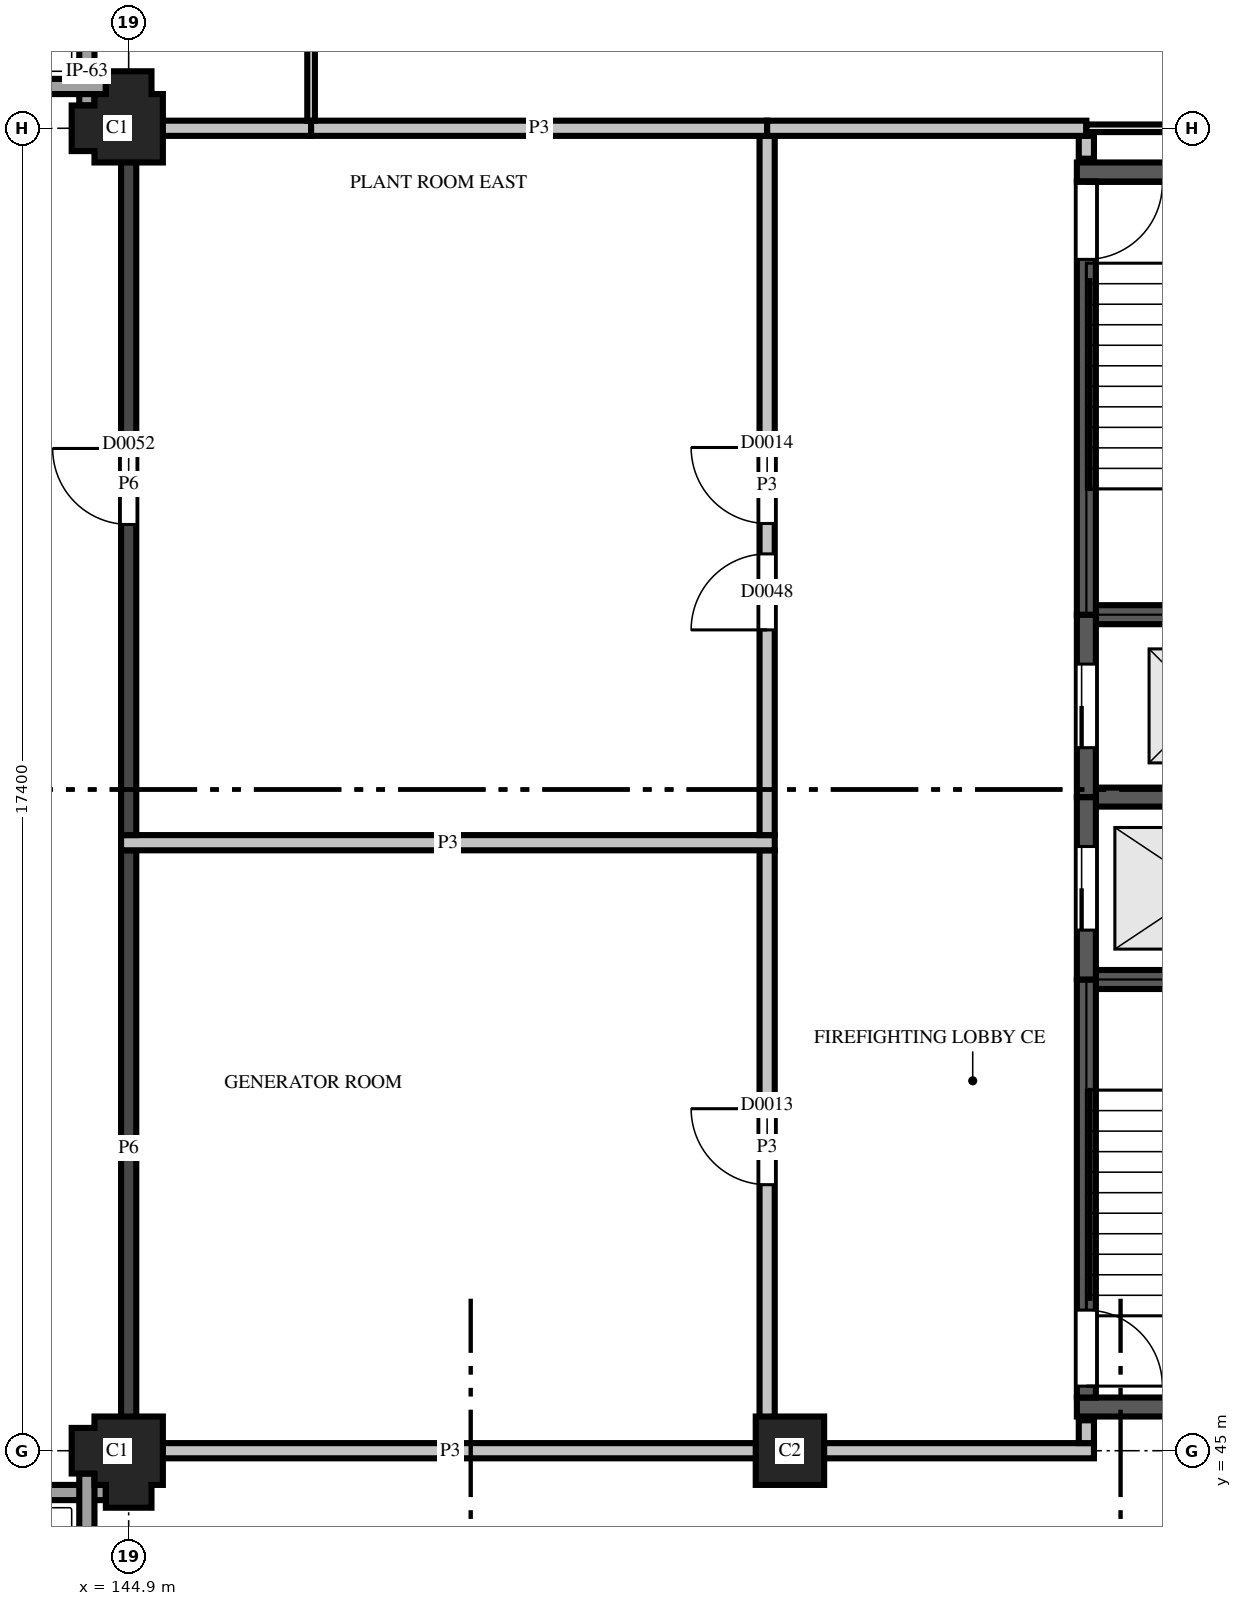
"""IFC4 building model, lengths in metres.
Left out: names, types, materials, properties, quantities, classifications, styles, units other than length and angle.
Written with IfcOpenShell. Run it as: python <this file> out.ifc"""

import sys

from ifc_helpers import new_model, si_unit, direction, frame, frame_2d, origin, place, context, subcontext, project, spatial, polyline, rectangle, outline, extrude, element, fill, save


model = new_model("IFC4")
c1 = context("Model", 3, precision=1e-05, world=origin(), true_north=direction((0.0, 1.0)))
c2 = subcontext(c1, "Body", "Model", "MODEL_VIEW")
j1 = project(units=[si_unit("LENGTHUNIT", "METRE"), si_unit("PLANEANGLEUNIT", "RADIAN")], contexts=[c1])
p1 = place(None, origin())
s1 = spatial("IfcSite", under=j1, at=p1, CompositionType="ELEMENT")
p2 = place(p1, origin())
s2 = spatial("IfcBuilding", under=s1, at=p2, CompositionType="ELEMENT")
p3 = place(p2, origin())
s3 = spatial("IfcBuildingStorey", under=s2, at=p3, CompositionType="ELEMENT", Elevation=0.0)
p4 = place(p3, frame((144.9, 45.0, 0.0), z_axis=(0.0, 0.0, 1.0), x_axis=(-1.0, 0.0, 0.0)))
e1 = element("IfcColumn", 1, at=p4, inside=s3, PredefinedType="COLUMN", context=c2, shape_type="SweptSolid", body=[
    extrude(outline(polyline([(-0.45, -0.45), (0.45, -0.45), (0.45, -0.3), (0.75, -0.3), (0.75, 0.3), (0.45, 0.3), (0.45, 0.45), (0.3, 0.45), (0.3, 0.75), (-0.3, 0.75), (-0.3, 0.45), (-0.45, 0.45), (-0.45, -0.45)])), origin(), (0.0, 0.0, 1.0), 4.5),
])
p5 = place(p3, frame((153.6, 45.0, 0.0), z_axis=(0.0, 0.0, 1.0), x_axis=(1.0, 0.0, 0.0)))
e2 = element("IfcColumn", 2, at=p5, inside=s3, PredefinedType="COLUMN", context=c2, shape_type="SweptSolid", body=[
    extrude(outline(polyline([(-0.45, -0.45), (0.45, -0.45), (0.45, 0.45), (-0.45, 0.45), (-0.45, -0.45)])), origin(), (0.0, 0.0, 1.0), 4.5),
])
p6 = place(p3, frame((144.9, 62.4, 0.0), z_axis=(0.0, 0.0, 1.0), x_axis=(0.0, 1.0, 0.0)))
e3 = element("IfcColumn", 3, at=p6, inside=s3, PredefinedType="COLUMN", context=c2, shape_type="SweptSolid", body=[
    extrude(outline(polyline([(-0.45, -0.45), (0.45, -0.45), (0.45, -0.3), (0.75, -0.3), (0.75, 0.3), (0.45, 0.3), (0.45, 0.45), (0.3, 0.45), (0.3, 0.75), (-0.3, 0.75), (-0.3, 0.45), (-0.45, 0.45), (-0.45, -0.45)])), origin(), (0.0, 0.0, 1.0), 4.5),
])
p7 = place(p3, frame((157.375, 45.575, 0.0), z_axis=(0.0, 0.0, 1.0), x_axis=(1.0, 0.0, 0.0)))
e4 = element("IfcWall", 4, at=p7, inside=s3, PredefinedType="SHEAR", context=c2, shape_type="SweptSolid", body=[
    extrude(rectangle(XDim=4.475, YDim=0.25, at=frame_2d((2.238, 0.0))), origin(), (0.0, 0.0, 1.0), 4.5),
])
p8 = place(p3, frame((157.625, 51.2, 0.0), z_axis=(0.0, 0.0, 1.0), x_axis=(1.0, 0.0, 0.0)))
e5 = element("IfcWall", 5, at=p8, inside=s3, PredefinedType="SHEAR", context=c2, shape_type="SweptSolid", body=[
    extrude(rectangle(XDim=3.025, YDim=0.25, at=frame_2d((1.512, 0.0))), origin(), (0.0, 0.0, 1.0), 4.5),
])
p9 = place(p3, frame((157.625, 53.6, -1.4), z_axis=(0.0, 0.0, 1.0), x_axis=(1.0, 0.0, 0.0)))
e6 = element("IfcWall", 6, at=p9, inside=s3, PredefinedType="SHEAR", context=c2, shape_type="SweptSolid", body=[
    extrude(rectangle(XDim=2.9, YDim=0.25, at=frame_2d((1.45, 0.0))), origin(), (0.0, 0.0, 1.0), 5.9),
])
p10 = place(p3, frame((157.625, 56.0, 0.0), z_axis=(0.0, 0.0, 1.0), x_axis=(1.0, 0.0, 0.0)))
e7 = element("IfcWall", 7, at=p10, inside=s3, PredefinedType="SHEAR", context=c2, shape_type="SweptSolid", body=[
    extrude(rectangle(XDim=3.025, YDim=0.25, at=frame_2d((1.512, 0.0))), origin(), (0.0, 0.0, 1.0), 4.5),
])
p11 = place(p3, frame((157.375, 61.825, 0.0), z_axis=(0.0, 0.0, 1.0), x_axis=(1.0, 0.0, 0.0)))
e8 = element("IfcWall", 8, at=p11, inside=s3, PredefinedType="SHEAR", context=c2, shape_type="SweptSolid", body=[
    extrude(rectangle(XDim=4.475, YDim=0.25, at=frame_2d((2.238, 0.0))), origin(), (0.0, 0.0, 1.0), 4.5),
])
p12 = place(p3, frame((157.5, 45.7, 0.0), z_axis=(0.0, 0.0, 1.0), x_axis=(0.0, 1.0, 0.0)))
e9 = element("IfcWall", 9, at=p12, inside=s3, PredefinedType="SHEAR", context=c2, shape_type="SweptSolid", body=[
    extrude(rectangle(XDim=5.5, YDim=0.25, at=frame_2d((2.75, 0.0))), origin(), (0.0, 0.0, 1.0), 4.5),
])
p13 = place(p12, frame((0.15, 0.0, 0.0)))
e10 = element("IfcOpeningElement", 10, at=p13, cuts=e9, PredefinedType="OPENING", context=c2, shape_type="SweptSolid", body=[
    extrude(rectangle(XDim=1.0, YDim=2.1, at=frame_2d((0.5, 1.05))), frame((0.0, 0.135, 0.0), z_axis=(0.0, -1.0, 0.0), x_axis=(1.0, 0.0, 0.0)), (0.0, 0.0, 1.0), 0.27),
])
p14 = place(p3, frame((157.5, 51.2, -1.4), z_axis=(0.0, 0.0, 1.0), x_axis=(0.0, 1.0, 0.0)))
e11 = element("IfcWall", 11, at=p14, inside=s3, PredefinedType="SHEAR", context=c2, shape_type="SweptSolid", body=[
    extrude(rectangle(XDim=2.4, YDim=0.25, at=frame_2d((1.2, 0.0))), origin(), (0.0, 0.0, 1.0), 5.9),
])
p15 = place(p14, frame((0.65, 0.0, 1.4)))
e12 = element("IfcOpeningElement", 12, at=p15, cuts=e11, PredefinedType="OPENING", context=c2, shape_type="SweptSolid", body=[
    extrude(rectangle(XDim=1.1, YDim=2.1, at=frame_2d((0.55, 1.05))), frame((0.0, 0.135, 0.0), z_axis=(0.0, -1.0, 0.0), x_axis=(1.0, 0.0, 0.0)), (0.0, 0.0, 1.0), 0.27),
])
p16 = place(p3, frame((157.5, 53.6, -1.4), z_axis=(0.0, 0.0, 1.0), x_axis=(0.0, 1.0, 0.0)))
e13 = element("IfcWall", 13, at=p16, inside=s3, PredefinedType="SHEAR", context=c2, shape_type="SweptSolid", body=[
    extrude(rectangle(XDim=2.4, YDim=0.25, at=frame_2d((1.2, 0.0))), origin(), (0.0, 0.0, 1.0), 5.9),
])
p17 = place(p16, frame((0.65, 0.0, 1.4)))
e14 = element("IfcOpeningElement", 14, at=p17, cuts=e13, PredefinedType="OPENING", context=c2, shape_type="SweptSolid", body=[
    extrude(rectangle(XDim=1.1, YDim=2.1, at=frame_2d((0.55, 1.05))), frame((0.0, 0.135, 0.0), z_axis=(0.0, -1.0, 0.0), x_axis=(1.0, 0.0, 0.0)), (0.0, 0.0, 1.0), 0.27),
])
p18 = place(p3, frame((157.5, 56.0, 0.0), z_axis=(0.0, 0.0, 1.0), x_axis=(0.0, 1.0, 0.0)))
e15 = element("IfcWall", 15, at=p18, inside=s3, PredefinedType="SHEAR", context=c2, shape_type="SweptSolid", body=[
    extrude(rectangle(XDim=5.7, YDim=0.25, at=frame_2d((2.85, 0.0))), origin(), (0.0, 0.0, 1.0), 4.5),
])
p19 = place(p18, frame((4.675, 0.0, 0.0)))
e16 = element("IfcOpeningElement", 16, at=p19, cuts=e15, PredefinedType="OPENING", context=c2, shape_type="SweptSolid", body=[
    extrude(rectangle(XDim=1.0, YDim=2.1, at=frame_2d((0.5, 1.05))), frame((0.0, 0.135, 0.0), z_axis=(0.0, -1.0, 0.0), x_axis=(1.0, 0.0, 0.0)), (0.0, 0.0, 1.0), 0.27),
])
p20 = place(p3, frame((137.7, 44.45, 0.0), z_axis=(0.0, 0.0, 1.0), x_axis=(1.0, 0.0, 0.0)))
e17 = element("IfcWall", 17, at=p20, inside=s3, PredefinedType="SOLIDWALL", context=c2, shape_type="SweptSolid", body=[
    extrude(outline(polyline([(0.0, 0.0), (6.9, 0.0), (6.9, 3.1), (6.002, 3.1), (6.0, 2.4), (5.681, 2.56), (5.363, 2.695), (5.044, 2.806), (4.725, 2.895), (4.406, 2.963), (4.087, 3.012), (3.769, 3.041), (3.45, 3.05), (3.131, 3.041), (2.812, 3.012), (2.494, 2.963), (2.175, 2.895), (1.856, 2.806), (1.538, 2.695), (1.219, 2.56), (0.9, 2.4), (0.898, 3.1), (0.0, 3.1), (0.0, 0.0)])), frame((0.0, 0.1, 0.0), z_axis=(0.0, -1.0, 0.0), x_axis=(1.0, 0.0, 0.0)), (0.0, 0.0, 1.0), 0.2),
])
p21 = place(p20, frame((3.0, 0.0, 2.4)))
e18 = element("IfcOpeningElement", 18, at=p21, cuts=e17, PredefinedType="OPENING", context=c2, shape_type="SweptSolid", body=[
    extrude(rectangle(XDim=0.9, YDim=0.531, at=frame_2d((0.45, 0.266))), frame((0.0, 0.11, 0.0), z_axis=(0.0, -1.0, 0.0), x_axis=(1.0, 0.0, 0.0)), (0.0, 0.0, 1.0), 0.22),
])
p22 = place(p3, frame((144.35, 44.7, 0.0), z_axis=(0.0, 0.0, 1.0), x_axis=(0.0, -1.0, 0.0)))
e19 = element("IfcWall", 19, at=p22, inside=s3, PredefinedType="SOLIDWALL", context=c2, shape_type="SweptSolid", body=[
    extrude(outline(polyline([(0.0, 0.0), (6.9, 0.0), (6.9, 3.1), (6.002, 3.1), (6.0, 2.4), (5.681, 2.56), (5.363, 2.695), (5.044, 2.806), (4.725, 2.895), (4.406, 2.963), (4.087, 3.012), (3.769, 3.041), (3.45, 3.05), (3.131, 3.041), (2.812, 3.012), (2.494, 2.963), (2.175, 2.895), (1.856, 2.806), (1.538, 2.695), (1.219, 2.56), (0.9, 2.4), (0.898, 3.1), (0.0, 3.1), (0.0, 0.0)])), frame((0.0, 0.1, 0.0), z_axis=(0.0, -1.0, 0.0), x_axis=(1.0, 0.0, 0.0)), (0.0, 0.0, 1.0), 0.2),
])
p23 = place(p22, frame((3.0, 0.0, 2.4)))
e20 = element("IfcOpeningElement", 20, at=p23, cuts=e19, PredefinedType="OPENING", context=c2, shape_type="SweptSolid", body=[
    extrude(rectangle(XDim=0.9, YDim=0.531, at=frame_2d((0.45, 0.266))), frame((0.0, 0.11, 0.0), z_axis=(0.0, -1.0, 0.0), x_axis=(1.0, 0.0, 0.0)), (0.0, 0.0, 1.0), 0.22),
])
p24 = place(p3, frame((144.35, 63.6, 0.0), z_axis=(0.0, 0.0, 1.0), x_axis=(0.0, -1.0, 0.0)))
e21 = element("IfcWall", 21, at=p24, inside=s3, PredefinedType="SOLIDWALL", context=c2, shape_type="SweptSolid", body=[
    extrude(rectangle(XDim=0.9, YDim=0.2, at=frame_2d((0.45, 0.0))), origin(), (0.0, 0.0, 1.0), 3.1),
])
p25 = place(p3, frame((144.6, 62.95, 0.0), z_axis=(0.0, 0.0, 1.0), x_axis=(-1.0, 0.0, 0.0)))
e22 = element("IfcWall", 22, at=p25, inside=s3, PredefinedType="SOLIDWALL", context=c2, shape_type="SweptSolid", body=[
    extrude(outline(polyline([(0.0, 0.0), (6.9, 0.0), (6.9, 2.4), (6.581, 2.56), (6.262, 2.695), (5.944, 2.806), (5.625, 2.895), (5.306, 2.963), (4.988, 3.012), (4.669, 3.041), (4.35, 3.05), (4.031, 3.041), (3.712, 3.012), (3.394, 2.963), (3.075, 2.895), (2.756, 2.806), (2.438, 2.695), (2.119, 2.56), (1.8, 2.4), (1.798, 3.1), (0.0, 3.1), (0.0, 0.0)])), frame((0.0, 0.1, 0.0), z_axis=(0.0, -1.0, 0.0), x_axis=(1.0, 0.0, 0.0)), (0.0, 0.0, 1.0), 0.2),
])
p26 = place(p25, frame((5.5, 0.0, 0.0)))
e23 = element("IfcOpeningElement", 23, at=p26, cuts=e22, PredefinedType="OPENING", context=c2, shape_type="SweptSolid", body=[
    extrude(rectangle(XDim=1.1, YDim=2.1, at=frame_2d((0.55, 1.05))), frame((0.0, 0.11, 0.0), z_axis=(0.0, -1.0, 0.0), x_axis=(1.0, 0.0, 0.0)), (0.0, 0.0, 1.0), 0.22),
])
p27 = place(p3, frame((144.96, 45.0, 0.0), z_axis=(0.0, 0.0, 1.0), x_axis=(1.0, 0.0, 0.0)))
e24 = element("IfcWall", 24, at=p27, inside=s3, PredefinedType="PARTITIONING", context=c2, shape_type="SweptSolid", body=[
    extrude(rectangle(XDim=8.34, YDim=0.2, at=frame_2d((4.17, 0.0))), origin(), (0.0, 0.0, 1.0), 3.68),
])
p28 = place(p3, frame((153.3, 45.0, 0.0), z_axis=(0.0, 0.0, 1.0), x_axis=(1.0, 0.0, 0.0)))
e25 = element("IfcWall", 25, at=p28, inside=s3, PredefinedType="PARTITIONING", context=c2, shape_type="SweptSolid", body=[
    extrude(rectangle(XDim=4.3, YDim=0.2, at=frame_2d((2.15, 0.0))), origin(), (0.0, 0.0, 1.0), 3.68),
])
p29 = place(p3, frame((157.5, 45.1, 0.0), z_axis=(0.0, 0.0, 1.0), x_axis=(0.0, 1.0, 0.0)))
e26 = element("IfcWall", 26, at=p29, inside=s3, PredefinedType="PARTITIONING", context=c2, shape_type="SweptSolid", body=[
    extrude(rectangle(XDim=0.3, YDim=0.2, at=frame_2d((0.15, 0.0))), origin(), (0.0, 0.0, 1.0), 3.68),
])
p30 = place(p3, frame((144.9, 52.9, 0.0), z_axis=(0.0, 0.0, 1.0), x_axis=(0.0, -1.0, 0.0)))
e27 = element("IfcWall", 27, at=p30, inside=s3, PredefinedType="PARTITIONING", context=c2, shape_type="SweptSolid", body=[
    extrude(rectangle(XDim=7.84, YDim=0.2, at=frame_2d((3.92, 0.0))), origin(), (0.0, 0.0, 1.0), 3.0),
])
p31 = place(p3, frame((153.3, 52.9, 0.0), z_axis=(0.0, 0.0, 1.0), x_axis=(0.0, -1.0, 0.0)))
e28 = element("IfcWall", 28, at=p31, inside=s3, PredefinedType="PARTITIONING", context=c2, shape_type="SweptSolid", body=[
    extrude(rectangle(XDim=7.8, YDim=0.2, at=frame_2d((3.9, 0.0))), origin(), (0.0, 0.0, 1.0), 3.68),
])
p32 = place(p31, frame((3.4, 0.0, 0.0)))
e29 = element("IfcOpeningElement", 29, at=p32, cuts=e28, PredefinedType="OPENING", context=c2, shape_type="SweptSolid", body=[
    extrude(rectangle(XDim=1.0, YDim=2.1, at=frame_2d((0.5, 1.05))), frame((0.0, 0.11, 0.0), z_axis=(0.0, -1.0, 0.0), x_axis=(1.0, 0.0, 0.0)), (0.0, 0.0, 1.0), 0.22),
])
p33 = place(p3, frame((153.4, 53.0, 0.0), z_axis=(0.0, 0.0, 1.0), x_axis=(-1.0, 0.0, 0.0)))
e30 = element("IfcWall", 30, at=p33, inside=s3, PredefinedType="PARTITIONING", context=c2, shape_type="SweptSolid", body=[
    extrude(rectangle(XDim=8.6, YDim=0.2, at=frame_2d((4.3, 0.0))), origin(), (0.0, 0.0, 1.0), 3.68),
])
p34 = place(p3, frame((157.5, 62.0, 0.0), z_axis=(0.0, 0.0, 1.0), x_axis=(0.0, 1.0, 0.0)))
e31 = element("IfcWall", 31, at=p34, inside=s3, PredefinedType="PARTITIONING", context=c2, shape_type="SweptSolid", body=[
    extrude(rectangle(XDim=0.3, YDim=0.2, at=frame_2d((0.15, 0.0))), origin(), (0.0, 0.0, 1.0), 3.68),
])
p35 = place(p3, frame((144.9, 62.34, 0.0), z_axis=(0.0, 0.0, 1.0), x_axis=(0.0, -1.0, 0.0)))
e32 = element("IfcWall", 32, at=p35, inside=s3, PredefinedType="PARTITIONING", context=c2, shape_type="SweptSolid", body=[
    extrude(rectangle(XDim=9.24, YDim=0.2, at=frame_2d((4.62, 0.0))), origin(), (0.0, 0.0, 1.0), 3.0),
])
p36 = place(p35, frame((4.153, 0.0, 0.0)))
e33 = element("IfcOpeningElement", 33, at=p36, cuts=e32, PredefinedType="OPENING", context=c2, shape_type="SweptSolid", body=[
    extrude(rectangle(XDim=1.0, YDim=2.1, at=frame_2d((0.5, 1.05))), frame((0.0, 0.11, 0.0), z_axis=(0.0, -1.0, 0.0), x_axis=(1.0, 0.0, 0.0)), (0.0, 0.0, 1.0), 0.22),
])
p37 = place(p3, frame((147.3, 62.4, 0.0), z_axis=(0.0, 0.0, 1.0), x_axis=(-1.0, 0.0, 0.0)))
e34 = element("IfcWall", 34, at=p37, inside=s3, PredefinedType="PARTITIONING", context=c2, shape_type="SweptSolid", body=[
    extrude(rectangle(XDim=2.34, YDim=0.2, at=frame_2d((1.17, 0.0))), origin(), (0.0, 0.0, 1.0), 3.68),
])
p38 = place(p3, frame((153.3, 62.3, 0.0), z_axis=(0.0, 0.0, 1.0), x_axis=(0.0, -1.0, 0.0)))
e35 = element("IfcWall", 35, at=p38, inside=s3, PredefinedType="PARTITIONING", context=c2, shape_type="SweptSolid", body=[
    extrude(rectangle(XDim=9.2, YDim=0.2, at=frame_2d((4.6, 0.0))), origin(), (0.0, 0.0, 1.0), 3.68),
])
p39 = place(p38, frame((4.1, 0.0, 0.0)))
e36 = element("IfcOpeningElement", 36, at=p39, cuts=e35, PredefinedType="OPENING", context=c2, shape_type="SweptSolid", body=[
    extrude(rectangle(XDim=1.0, YDim=2.1, at=frame_2d((0.5, 1.05))), frame((0.0, 0.11, 0.0), z_axis=(0.0, -1.0, 0.0), x_axis=(1.0, 0.0, 0.0)), (0.0, 0.0, 1.0), 0.22),
])
p40 = place(p38, frame((5.5, 0.0, 0.0)))
e37 = element("IfcOpeningElement", 37, at=p40, cuts=e35, PredefinedType="OPENING", context=c2, shape_type="SweptSolid", body=[
    extrude(rectangle(XDim=1.0, YDim=2.1, at=frame_2d((0.5, 1.05))), frame((0.0, 0.11, 0.0), z_axis=(0.0, -1.0, 0.0), x_axis=(1.0, 0.0, 0.0)), (0.0, 0.0, 1.0), 0.22),
])
p41 = place(p3, frame((153.3, 62.4, 0.0), z_axis=(0.0, 0.0, 1.0), x_axis=(-1.0, 0.0, 0.0)))
e38 = element("IfcWall", 38, at=p41, inside=s3, PredefinedType="PARTITIONING", context=c2, shape_type="SweptSolid", body=[
    extrude(rectangle(XDim=6.0, YDim=0.2, at=frame_2d((3.0, 0.0))), origin(), (0.0, 0.0, 1.0), 3.68),
])
p42 = place(p3, frame((157.5, 62.4, 0.0), z_axis=(0.0, 0.0, 1.0), x_axis=(-1.0, 0.0, 0.0)))
e39 = element("IfcWall", 39, at=p42, inside=s3, PredefinedType="PARTITIONING", context=c2, shape_type="SweptSolid", body=[
    extrude(rectangle(XDim=4.2, YDim=0.2, at=frame_2d((2.1, 0.0))), origin(), (0.0, 0.0, 1.0), 3.68),
])
p43 = place(p3, frame((157.5, 62.4, 0.0), z_axis=(0.0, 0.0, 1.0), x_axis=(1.0, 0.0, 0.0)))
e40 = element("IfcWall", 40, at=p43, inside=s3, PredefinedType="PARTITIONING", context=c2, shape_type="SweptSolid", body=[
    extrude(rectangle(XDim=4.74, YDim=0.1, at=frame_2d((2.37, 0.0))), origin(), (0.0, 0.0, 1.0), 3.68),
])
p44 = place(p3, frame((147.3, 84.85, 0.0), z_axis=(0.0, 0.0, 1.0), x_axis=(0.0, -1.0, 0.0)))
e41 = element("IfcWall", 41, at=p44, inside=s3, PredefinedType="PARTITIONING", context=c2, shape_type="SweptSolid", body=[
    extrude(rectangle(XDim=22.35, YDim=0.1, at=frame_2d((11.175, 0.0))), origin(), (0.0, 0.0, 1.0), 3.68),
])
p45 = place(p44, frame((10.725, 0.0, 0.0)))
e42 = element("IfcOpeningElement", 42, at=p45, cuts=e41, PredefinedType="OPENING", context=c2, shape_type="SweptSolid", body=[
    extrude(rectangle(XDim=0.9, YDim=2.1, at=frame_2d((0.45, 1.05))), frame((0.0, 0.06, 0.0), z_axis=(0.0, -1.0, 0.0), x_axis=(1.0, 0.0, 0.0)), (0.0, 0.0, 1.0), 0.12),
])
p46 = place(p32, origin())
e43 = element("IfcDoor", 43, at=p46, inside=s3, OperationType="SINGLE_SWING_LEFT", PredefinedType="DOOR", context=c2, shape_type="SweptSolid", body=[
    extrude(rectangle(XDim=1.0, YDim=2.1, at=frame_2d((0.5, 1.05))), frame((0.0, 0.025, 0.0), z_axis=(0.0, -1.0, 0.0), x_axis=(1.0, 0.0, 0.0)), (0.0, 0.0, 1.0), 0.05),
])
fill(e29, e43)
p47 = place(p39, origin())
e44 = element("IfcDoor", 44, at=p47, inside=s3, OperationType="SINGLE_SWING_LEFT", PredefinedType="DOOR", context=c2, shape_type="SweptSolid", body=[
    extrude(rectangle(XDim=1.0, YDim=2.1, at=frame_2d((0.5, 1.05))), frame((0.0, 0.025, 0.0), z_axis=(0.0, -1.0, 0.0), x_axis=(1.0, 0.0, 0.0)), (0.0, 0.0, 1.0), 0.05),
])
fill(e36, e44)
p48 = place(p40, origin())
e45 = element("IfcDoor", 45, at=p48, inside=s3, OperationType="SINGLE_SWING_RIGHT", PredefinedType="DOOR", context=c2, shape_type="SweptSolid", body=[
    extrude(rectangle(XDim=1.0, YDim=2.1, at=frame_2d((0.5, 1.05))), frame((0.0, 0.025, 0.0), z_axis=(0.0, -1.0, 0.0), x_axis=(1.0, 0.0, 0.0)), (0.0, 0.0, 1.0), 0.05),
])
fill(e37, e45)
p49 = place(p15, origin())
e46 = element("IfcDoor", 46, at=p49, inside=s3, OperationType="SLIDING_TO_LEFT", PredefinedType="DOOR", context=c2, shape_type="SweptSolid", body=[
    extrude(rectangle(XDim=1.1, YDim=2.1, at=frame_2d((0.55, 1.05))), frame((0.0, 0.025, 0.0), z_axis=(0.0, -1.0, 0.0), x_axis=(1.0, 0.0, 0.0)), (0.0, 0.0, 1.0), 0.05),
])
fill(e12, e46)
p50 = place(p17, origin())
e47 = element("IfcDoor", 47, at=p50, inside=s3, OperationType="SLIDING_TO_LEFT", PredefinedType="DOOR", context=c2, shape_type="SweptSolid", body=[
    extrude(rectangle(XDim=1.1, YDim=2.1, at=frame_2d((0.55, 1.05))), frame((0.0, 0.025, 0.0), z_axis=(0.0, -1.0, 0.0), x_axis=(1.0, 0.0, 0.0)), (0.0, 0.0, 1.0), 0.05),
])
fill(e14, e47)
p51 = place(p19, origin())
e48 = element("IfcDoor", 48, at=p51, inside=s3, OperationType="SINGLE_SWING_RIGHT", PredefinedType="DOOR", context=c2, shape_type="SweptSolid", body=[
    extrude(rectangle(XDim=1.0, YDim=2.1, at=frame_2d((0.5, 1.05))), frame((0.0, 0.025, 0.0), z_axis=(0.0, -1.0, 0.0), x_axis=(1.0, 0.0, 0.0)), (0.0, 0.0, 1.0), 0.05),
])
fill(e16, e48)
p52 = place(p13, origin())
e49 = element("IfcDoor", 49, at=p52, inside=s3, OperationType="SINGLE_SWING_LEFT", PredefinedType="DOOR", context=c2, shape_type="SweptSolid", body=[
    extrude(rectangle(XDim=1.0, YDim=2.1, at=frame_2d((0.5, 1.05))), frame((0.0, 0.025, 0.0), z_axis=(0.0, -1.0, 0.0), x_axis=(1.0, 0.0, 0.0)), (0.0, 0.0, 1.0), 0.05),
])
fill(e10, e49)
p53 = place(p36, origin())
e50 = element("IfcDoor", 50, at=p53, inside=s3, OperationType="SINGLE_SWING_LEFT", PredefinedType="DOOR", context=c2, shape_type="SweptSolid", body=[
    extrude(rectangle(XDim=1.0, YDim=2.1, at=frame_2d((0.5, 1.05))), frame((0.0, 0.025, 0.0), z_axis=(0.0, -1.0, 0.0), x_axis=(1.0, 0.0, 0.0)), (0.0, 0.0, 1.0), 0.05),
])
fill(e33, e50)
save(model, sys.argv[1])
